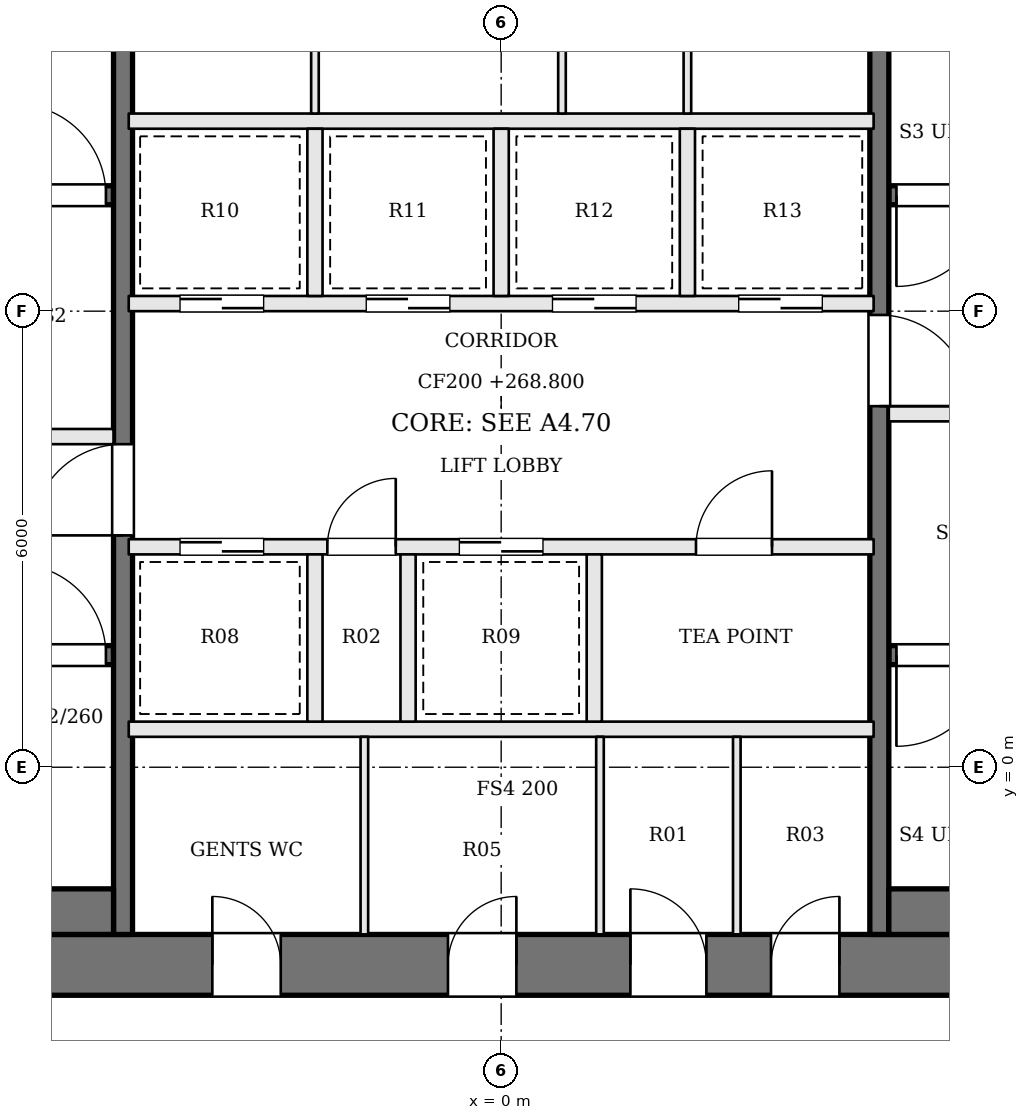
"""IFC4 building model, lengths in metres.
Left out: names, types, materials, properties, quantities, classifications, styles, units other than length and angle.
Written with IfcOpenShell. Run it as: python <this file> out.ifc"""

import sys

from ifc_helpers import new_model, si_unit, direction, frame, frame_2d, origin, place, context, subcontext, project, spatial, rectangle, extrude, element, fill, save


model = new_model("IFC4")
c1 = context("Model", 3, precision=1e-05, world=origin(), true_north=direction((0.0, 1.0)))
c2 = subcontext(c1, "Body", "Model", "MODEL_VIEW")
j1 = project(units=[si_unit("LENGTHUNIT", "METRE"), si_unit("PLANEANGLEUNIT", "RADIAN")], contexts=[c1])
p1 = place(None, origin())
s1 = spatial("IfcSite", under=j1, at=p1, CompositionType="ELEMENT")
p2 = place(p1, origin())
s2 = spatial("IfcBuilding", under=s1, at=p2, CompositionType="ELEMENT")
p3 = place(p2, frame((0.0, 0.0, 268.8)))
s3 = spatial("IfcBuildingStorey", under=s2, at=p3, CompositionType="ELEMENT", Elevation=268.8)
p4 = place(p3, frame((-13.0, -2.6, 0.0), z_axis=(0.0, 0.0, 1.0), x_axis=(1.0, 0.0, 0.0)))
e1 = element("IfcWall", 1, at=p4, inside=s3, PredefinedType="SHEAR", context=c2, shape_type="SweptSolid", body=[
    extrude(rectangle(XDim=26.0, YDim=0.8, at=frame_2d((13.0, 0.0))), origin(), (0.0, 0.0, 1.0), 3.9),
])
p5 = place(p4, frame((9.2, 0.0, 0.0)))
e2 = element("IfcOpeningElement", 2, at=p5, cuts=e1, PredefinedType="OPENING", context=c2, shape_type="SweptSolid", body=[
    extrude(rectangle(XDim=0.9, YDim=2.1, at=frame_2d((0.45, 1.05))), frame((0.0, 0.41, 0.0), z_axis=(0.0, -1.0, 0.0), x_axis=(1.0, 0.0, 0.0)), (0.0, 0.0, 1.0), 0.82),
])
p6 = place(p4, frame((12.3, 0.0, 0.0)))
e3 = element("IfcOpeningElement", 3, at=p6, cuts=e1, PredefinedType="OPENING", context=c2, shape_type="SweptSolid", body=[
    extrude(rectangle(XDim=0.9, YDim=2.1, at=frame_2d((0.45, 1.05))), frame((0.0, 0.41, 0.0), z_axis=(0.0, -1.0, 0.0), x_axis=(1.0, 0.0, 0.0)), (0.0, 0.0, 1.0), 0.82),
])
p7 = place(p4, frame((14.7, 0.0, 0.0)))
e4 = element("IfcOpeningElement", 4, at=p7, cuts=e1, PredefinedType="OPENING", context=c2, shape_type="SweptSolid", body=[
    extrude(rectangle(XDim=1.0, YDim=2.1, at=frame_2d((0.5, 1.05))), frame((0.0, 0.41, 0.0), z_axis=(0.0, -1.0, 0.0), x_axis=(1.0, 0.0, 0.0)), (0.0, 0.0, 1.0), 0.82),
])
p8 = place(p4, frame((16.55, 0.0, 0.0)))
e5 = element("IfcOpeningElement", 5, at=p8, cuts=e1, PredefinedType="OPENING", context=c2, shape_type="SweptSolid", body=[
    extrude(rectangle(XDim=0.9, YDim=2.1, at=frame_2d((0.45, 1.05))), frame((0.0, 0.41, 0.0), z_axis=(0.0, -1.0, 0.0), x_axis=(1.0, 0.0, 0.0)), (0.0, 0.0, 1.0), 0.82),
])
p9 = place(p3, frame((-12.2, 1.475, 0.0), z_axis=(0.0, 0.0, 1.0), x_axis=(1.0, 0.0, 0.0)))
e6 = element("IfcWall", 6, at=p9, inside=s3, PredefinedType="SOLIDWALL", context=c2, shape_type="SweptSolid", body=[
    extrude(rectangle(XDim=7.1, YDim=0.25, at=frame_2d((3.55, 0.0))), origin(), (0.0, 0.0, 1.0), 3.7),
])
p10 = place(p9, frame((5.8, 0.0, 0.0)))
e7 = element("IfcOpeningElement", 7, at=p10, cuts=e6, PredefinedType="OPENING", context=c2, shape_type="SweptSolid", body=[
    extrude(rectangle(XDim=1.2, YDim=2.1, at=frame_2d((0.6, 1.05))), frame((0.0, 0.135, 0.0), z_axis=(0.0, -1.0, 0.0), x_axis=(1.0, 0.0, 0.0)), (0.0, 0.0, 1.0), 0.27),
])
p11 = place(p3, frame((12.2, 7.525, 0.0), z_axis=(0.0, 0.0, 1.0), x_axis=(-1.0, 0.0, 0.0)))
e8 = element("IfcWall", 8, at=p11, inside=s3, PredefinedType="SOLIDWALL", context=c2, shape_type="SweptSolid", body=[
    extrude(rectangle(XDim=7.1, YDim=0.25, at=frame_2d((3.55, 0.0))), origin(), (0.0, 0.0, 1.0), 3.7),
])
p12 = place(p11, frame((5.8, 0.0, 0.0)))
e9 = element("IfcOpeningElement", 9, at=p12, cuts=e8, PredefinedType="OPENING", context=c2, shape_type="SweptSolid", body=[
    extrude(rectangle(XDim=1.2, YDim=2.1, at=frame_2d((0.6, 1.05))), frame((0.0, 0.135, 0.0), z_axis=(0.0, -1.0, 0.0), x_axis=(1.0, 0.0, 0.0)), (0.0, 0.0, 1.0), 0.27),
])
p13 = place(p3, frame((-12.2, 4.35, 0.0), z_axis=(0.0, 0.0, 1.0), x_axis=(1.0, 0.0, 0.0)))
e10 = element("IfcWall", 10, at=p13, inside=s3, PredefinedType="SOLIDWALL", context=c2, shape_type="SweptSolid", body=[
    extrude(rectangle(XDim=7.1, YDim=0.2, at=frame_2d((3.55, 0.0))), origin(), (0.0, 0.0, 1.0), 3.7),
])
p14 = place(p13, frame((4.4, 0.0, 0.0)))
e11 = element("IfcOpeningElement", 11, at=p14, cuts=e10, PredefinedType="OPENING", context=c2, shape_type="SweptSolid", body=[
    extrude(rectangle(XDim=1.2, YDim=2.1, at=frame_2d((0.6, 1.05))), frame((0.0, 0.11, 0.0), z_axis=(0.0, -1.0, 0.0), x_axis=(1.0, 0.0, 0.0)), (0.0, 0.0, 1.0), 0.22),
])
p15 = place(p13, frame((1.1, 0.0, 0.0)))
e12 = element("IfcOpeningElement", 12, at=p15, cuts=e10, PredefinedType="OPENING", context=c2, shape_type="SweptSolid", body=[
    extrude(rectangle(XDim=1.2, YDim=2.1, at=frame_2d((0.6, 1.05))), frame((0.0, 0.11, 0.0), z_axis=(0.0, -1.0, 0.0), x_axis=(1.0, 0.0, 0.0)), (0.0, 0.0, 1.0), 0.22),
])
p16 = place(p3, frame((12.2, 4.65, 0.0), z_axis=(0.0, 0.0, 1.0), x_axis=(-1.0, 0.0, 0.0)))
e13 = element("IfcWall", 13, at=p16, inside=s3, PredefinedType="SOLIDWALL", context=c2, shape_type="SweptSolid", body=[
    extrude(rectangle(XDim=7.1, YDim=0.2, at=frame_2d((3.55, 0.0))), origin(), (0.0, 0.0, 1.0), 3.7),
])
p17 = place(p16, frame((4.4, 0.0, 0.0)))
e14 = element("IfcOpeningElement", 14, at=p17, cuts=e13, PredefinedType="OPENING", context=c2, shape_type="SweptSolid", body=[
    extrude(rectangle(XDim=1.2, YDim=2.1, at=frame_2d((0.6, 1.05))), frame((0.0, 0.11, 0.0), z_axis=(0.0, -1.0, 0.0), x_axis=(1.0, 0.0, 0.0)), (0.0, 0.0, 1.0), 0.22),
])
p18 = place(p16, frame((1.1, 0.0, 0.0)))
e15 = element("IfcOpeningElement", 15, at=p18, cuts=e13, PredefinedType="OPENING", context=c2, shape_type="SweptSolid", body=[
    extrude(rectangle(XDim=1.2, YDim=2.1, at=frame_2d((0.6, 1.05))), frame((0.0, 0.11, 0.0), z_axis=(0.0, -1.0, 0.0), x_axis=(1.0, 0.0, 0.0)), (0.0, 0.0, 1.0), 0.22),
])
p19 = place(p3, frame((-12.2, 7.525, 0.0), z_axis=(0.0, 0.0, 1.0), x_axis=(1.0, 0.0, 0.0)))
e16 = element("IfcWall", 16, at=p19, inside=s3, PredefinedType="SOLIDWALL", context=c2, shape_type="SweptSolid", body=[
    extrude(rectangle(XDim=7.1, YDim=0.25, at=frame_2d((3.55, 0.0))), origin(), (0.0, 0.0, 1.0), 3.7),
])
p20 = place(p19, frame((5.8, 0.0, 0.0)))
e17 = element("IfcOpeningElement", 17, at=p20, cuts=e16, PredefinedType="OPENING", context=c2, shape_type="SweptSolid", body=[
    extrude(rectangle(XDim=1.2, YDim=2.1, at=frame_2d((0.6, 1.05))), frame((0.0, 0.135, 0.0), z_axis=(0.0, -1.0, 0.0), x_axis=(1.0, 0.0, 0.0)), (0.0, 0.0, 1.0), 0.27),
])
p21 = place(p3, frame((12.2, 1.475, 0.0), z_axis=(0.0, 0.0, 1.0), x_axis=(-1.0, 0.0, 0.0)))
e18 = element("IfcWall", 18, at=p21, inside=s3, PredefinedType="SOLIDWALL", context=c2, shape_type="SweptSolid", body=[
    extrude(rectangle(XDim=7.1, YDim=0.25, at=frame_2d((3.55, 0.0))), origin(), (0.0, 0.0, 1.0), 3.7),
])
p22 = place(p21, frame((5.8, 0.0, 0.0)))
e19 = element("IfcOpeningElement", 19, at=p22, cuts=e18, PredefinedType="OPENING", context=c2, shape_type="SweptSolid", body=[
    extrude(rectangle(XDim=1.2, YDim=2.1, at=frame_2d((0.6, 1.05))), frame((0.0, 0.135, 0.0), z_axis=(0.0, -1.0, 0.0), x_axis=(1.0, 0.0, 0.0)), (0.0, 0.0, 1.0), 0.27),
])
p23 = place(p3, frame((-4.975, -2.2, 0.0), z_axis=(0.0, 0.0, 1.0), x_axis=(0.0, 1.0, 0.0)))
e20 = element("IfcWall", 20, at=p23, inside=s3, PredefinedType="SOLIDWALL", context=c2, shape_type="SweptSolid", body=[
    extrude(rectangle(XDim=13.4, YDim=0.25, at=frame_2d((6.7, 0.0))), origin(), (0.0, 0.0, 1.0), 3.7),
])
p24 = place(p23, frame((5.25, 0.0, 0.0)))
e21 = element("IfcOpeningElement", 21, at=p24, cuts=e20, PredefinedType="OPENING", context=c2, shape_type="SweptSolid", body=[
    extrude(rectangle(XDim=1.2, YDim=2.1, at=frame_2d((0.6, 1.05))), frame((0.0, 0.135, 0.0), z_axis=(0.0, -1.0, 0.0), x_axis=(1.0, 0.0, 0.0)), (0.0, 0.0, 1.0), 0.27),
])
p25 = place(p3, frame((4.975, 11.2, 0.0), z_axis=(0.0, 0.0, 1.0), x_axis=(0.0, -1.0, 0.0)))
e22 = element("IfcWall", 22, at=p25, inside=s3, PredefinedType="SOLIDWALL", context=c2, shape_type="SweptSolid", body=[
    extrude(rectangle(XDim=13.4, YDim=0.25, at=frame_2d((6.7, 0.0))), origin(), (0.0, 0.0, 1.0), 3.7),
])
p26 = place(p25, frame((5.25, 0.0, 0.0)))
e23 = element("IfcOpeningElement", 23, at=p26, cuts=e22, PredefinedType="OPENING", context=c2, shape_type="SweptSolid", body=[
    extrude(rectangle(XDim=1.2, YDim=2.1, at=frame_2d((0.6, 1.05))), frame((0.0, 0.135, 0.0), z_axis=(0.0, -1.0, 0.0), x_axis=(1.0, 0.0, 0.0)), (0.0, 0.0, 1.0), 0.27),
])
for number, where, z_axis, x_axis in (
    (24, (-12.2, -1.9, 0.0), (0.0, 0.0, 1.0), (1.0, 0.0, 0.0)),
    (25, (12.2, -1.9, 0.0), (0.0, 0.0, 1.0), (-1.0, 0.0, 0.0)),
):
    element("IfcWall", number, at=place(p3, frame(where, z_axis=z_axis, x_axis=x_axis)), inside=s3, PredefinedType="SOLIDWALL", context=c2, shape_type="SweptSolid", body=[
        extrude(rectangle(XDim=7.1, YDim=0.6, at=frame_2d((3.55, 0.0))), origin(), (0.0, 0.0, 1.0), 3.7),
    ])
p27 = place(p3, frame((-4.9, 0.5, 0.0), z_axis=(0.0, 0.0, 1.0), x_axis=(1.0, 0.0, 0.0)))
e26 = element("IfcWall", 26, at=p27, inside=s3, PredefinedType="SOLIDWALL", context=c2, shape_type="SweptSolid", body=[
    extrude(rectangle(XDim=9.8, YDim=0.2, at=frame_2d((4.9, 0.0))), origin(), (0.0, 0.0, 1.0), 3.7),
])
p28 = place(p3, frame((-4.9, 2.9, 0.0), z_axis=(0.0, 0.0, 1.0), x_axis=(1.0, 0.0, 0.0)))
e27 = element("IfcWall", 27, at=p28, inside=s3, PredefinedType="SOLIDWALL", context=c2, shape_type="SweptSolid", body=[
    extrude(rectangle(XDim=9.8, YDim=0.2, at=frame_2d((4.9, 0.0))), origin(), (0.0, 0.0, 1.0), 3.7),
])
p29 = place(p28, frame((0.675, 0.0, 0.0)))
e28 = element("IfcOpeningElement", 28, at=p29, cuts=e27, PredefinedType="OPENING", context=c2, shape_type="SweptSolid", body=[
    extrude(rectangle(XDim=1.1, YDim=2.1, at=frame_2d((0.55, 1.05))), frame((0.0, 0.11, 0.0), z_axis=(0.0, -1.0, 0.0), x_axis=(1.0, 0.0, 0.0)), (0.0, 0.0, 1.0), 0.22),
])
p30 = place(p28, frame((2.613, 0.0, 0.0)))
e29 = element("IfcOpeningElement", 29, at=p30, cuts=e27, PredefinedType="OPENING", context=c2, shape_type="SweptSolid", body=[
    extrude(rectangle(XDim=0.9, YDim=2.1, at=frame_2d((0.45, 1.05))), frame((0.0, 0.11, 0.0), z_axis=(0.0, -1.0, 0.0), x_axis=(1.0, 0.0, 0.0)), (0.0, 0.0, 1.0), 0.22),
])
p31 = place(p28, frame((4.35, 0.0, 0.0)))
e30 = element("IfcOpeningElement", 30, at=p31, cuts=e27, PredefinedType="OPENING", context=c2, shape_type="SweptSolid", body=[
    extrude(rectangle(XDim=1.1, YDim=2.1, at=frame_2d((0.55, 1.05))), frame((0.0, 0.11, 0.0), z_axis=(0.0, -1.0, 0.0), x_axis=(1.0, 0.0, 0.0)), (0.0, 0.0, 1.0), 0.22),
])
p32 = place(p28, frame((7.463, 0.0, 0.0)))
e31 = element("IfcOpeningElement", 31, at=p32, cuts=e27, PredefinedType="OPENING", context=c2, shape_type="SweptSolid", body=[
    extrude(rectangle(XDim=1.0, YDim=2.1, at=frame_2d((0.5, 1.05))), frame((0.0, 0.11, 0.0), z_axis=(0.0, -1.0, 0.0), x_axis=(1.0, 0.0, 0.0)), (0.0, 0.0, 1.0), 0.22),
])
p33 = place(p3, frame((-4.9, 6.1, 0.0), z_axis=(0.0, 0.0, 1.0), x_axis=(1.0, 0.0, 0.0)))
e32 = element("IfcWall", 32, at=p33, inside=s3, PredefinedType="SOLIDWALL", context=c2, shape_type="SweptSolid", body=[
    extrude(rectangle(XDim=9.8, YDim=0.2, at=frame_2d((4.9, 0.0))), origin(), (0.0, 0.0, 1.0), 3.7),
])
p34 = place(p33, frame((0.675, 0.0, 0.0)))
e33 = element("IfcOpeningElement", 33, at=p34, cuts=e32, PredefinedType="OPENING", context=c2, shape_type="SweptSolid", body=[
    extrude(rectangle(XDim=1.1, YDim=2.1, at=frame_2d((0.55, 1.05))), frame((0.0, 0.11, 0.0), z_axis=(0.0, -1.0, 0.0), x_axis=(1.0, 0.0, 0.0)), (0.0, 0.0, 1.0), 0.22),
])
p35 = place(p33, frame((3.125, 0.0, 0.0)))
e34 = element("IfcOpeningElement", 34, at=p35, cuts=e32, PredefinedType="OPENING", context=c2, shape_type="SweptSolid", body=[
    extrude(rectangle(XDim=1.1, YDim=2.1, at=frame_2d((0.55, 1.05))), frame((0.0, 0.11, 0.0), z_axis=(0.0, -1.0, 0.0), x_axis=(1.0, 0.0, 0.0)), (0.0, 0.0, 1.0), 0.22),
])
p36 = place(p33, frame((5.575, 0.0, 0.0)))
e35 = element("IfcOpeningElement", 35, at=p36, cuts=e32, PredefinedType="OPENING", context=c2, shape_type="SweptSolid", body=[
    extrude(rectangle(XDim=1.1, YDim=2.1, at=frame_2d((0.55, 1.05))), frame((0.0, 0.11, 0.0), z_axis=(0.0, -1.0, 0.0), x_axis=(1.0, 0.0, 0.0)), (0.0, 0.0, 1.0), 0.22),
])
p37 = place(p33, frame((8.025, 0.0, 0.0)))
e36 = element("IfcOpeningElement", 36, at=p37, cuts=e32, PredefinedType="OPENING", context=c2, shape_type="SweptSolid", body=[
    extrude(rectangle(XDim=1.1, YDim=2.1, at=frame_2d((0.55, 1.05))), frame((0.0, 0.11, 0.0), z_axis=(0.0, -1.0, 0.0), x_axis=(1.0, 0.0, 0.0)), (0.0, 0.0, 1.0), 0.22),
])
p38 = place(p3, frame((-4.9, 8.5, 0.0), z_axis=(0.0, 0.0, 1.0), x_axis=(1.0, 0.0, 0.0)))
e37 = element("IfcWall", 37, at=p38, inside=s3, PredefinedType="SOLIDWALL", context=c2, shape_type="SweptSolid", body=[
    extrude(rectangle(XDim=9.8, YDim=0.2, at=frame_2d((4.9, 0.0))), origin(), (0.0, 0.0, 1.0), 3.7),
])
for number, where, z_axis, x_axis in (
    (38, (-2.45, 0.6, 0.0), (0.0, 0.0, 1.0), (0.0, 1.0, 0.0)),
    (39, (-1.225, 0.6, 0.0), (0.0, 0.0, 1.0), (0.0, 1.0, 0.0)),
    (40, (1.225, 0.6, 0.0), (0.0, 0.0, 1.0), (0.0, 1.0, 0.0)),
    (41, (-2.45, 6.2, 0.0), (0.0, 0.0, 1.0), (0.0, 1.0, 0.0)),
    (42, (0.0, 6.2, 0.0), (0.0, 0.0, 1.0), (0.0, 1.0, 0.0)),
    (43, (2.45, 6.2, 0.0), (0.0, 0.0, 1.0), (0.0, 1.0, 0.0)),
):
    element("IfcWall", number, at=place(p3, frame(where, z_axis=z_axis, x_axis=x_axis)), inside=s3, PredefinedType="SOLIDWALL", context=c2, shape_type="SweptSolid", body=[
        extrude(rectangle(XDim=2.2, YDim=0.2, at=frame_2d((1.1, 0.0))), origin(), (0.0, 0.0, 1.0), 3.7),
    ])
for number, where, z_axis, x_axis in (
    (44, (-1.8, -2.2, 0.0), (0.0, 0.0, 1.0), (0.0, 1.0, 0.0)),
    (45, (1.3, -2.2, 0.0), (0.0, 0.0, 1.0), (0.0, 1.0, 0.0)),
    (46, (3.1, -2.2, 0.0), (0.0, 0.0, 1.0), (0.0, 1.0, 0.0)),
    (47, (-2.45, 8.6, 0.0), (0.0, 0.0, 1.0), (0.0, 1.0, 0.0)),
    (48, (0.8, 8.6, 0.0), (0.0, 0.0, 1.0), (0.0, 1.0, 0.0)),
    (49, (2.45, 8.6, 0.0), (0.0, 0.0, 1.0), (0.0, 1.0, 0.0)),
):
    element("IfcWall", number, at=place(p3, frame(where, z_axis=z_axis, x_axis=x_axis)), inside=s3, PredefinedType="PARTITIONING", context=c2, shape_type="SweptSolid", body=[
        extrude(rectangle(XDim=2.6, YDim=0.1, at=frame_2d((1.3, 0.0))), origin(), (0.0, 0.0, 1.0), 3.7),
    ])
p39 = place(p24, origin())
e50 = element("IfcDoor", 50, at=p39, inside=s3, OperationType="SINGLE_SWING_LEFT", PredefinedType="DOOR", context=c2, shape_type="SweptSolid", body=[
    extrude(rectangle(XDim=1.2, YDim=2.1, at=frame_2d((0.6, 1.05))), frame((0.0, 0.025, 0.0), z_axis=(0.0, -1.0, 0.0), x_axis=(1.0, 0.0, 0.0)), (0.0, 0.0, 1.0), 0.05),
])
fill(e21, e50)
p40 = place(p26, origin())
e51 = element("IfcDoor", 51, at=p40, inside=s3, OperationType="SINGLE_SWING_RIGHT", PredefinedType="DOOR", context=c2, shape_type="SweptSolid", body=[
    extrude(rectangle(XDim=1.2, YDim=2.1, at=frame_2d((0.6, 1.05))), frame((0.0, 0.025, 0.0), z_axis=(0.0, -1.0, 0.0), x_axis=(1.0, 0.0, 0.0)), (0.0, 0.0, 1.0), 0.05),
])
fill(e23, e51)
p41 = place(p10, origin())
e52 = element("IfcDoor", 52, at=p41, inside=s3, OperationType="SINGLE_SWING_LEFT", PredefinedType="DOOR", context=c2, shape_type="SweptSolid", body=[
    extrude(rectangle(XDim=1.2, YDim=2.1, at=frame_2d((0.6, 1.05))), frame((0.0, 0.025, 0.0), z_axis=(0.0, -1.0, 0.0), x_axis=(1.0, 0.0, 0.0)), (0.0, 0.0, 1.0), 0.05),
])
fill(e7, e52)
p42 = place(p12, origin())
e53 = element("IfcDoor", 53, at=p42, inside=s3, OperationType="SINGLE_SWING_RIGHT", PredefinedType="DOOR", context=c2, shape_type="SweptSolid", body=[
    extrude(rectangle(XDim=1.2, YDim=2.1, at=frame_2d((0.6, 1.05))), frame((0.0, 0.025, 0.0), z_axis=(0.0, -1.0, 0.0), x_axis=(1.0, 0.0, 0.0)), (0.0, 0.0, 1.0), 0.05),
])
fill(e9, e53)
p43 = place(p20, origin())
e54 = element("IfcDoor", 54, at=p43, inside=s3, OperationType="SINGLE_SWING_LEFT", PredefinedType="DOOR", context=c2, shape_type="SweptSolid", body=[
    extrude(rectangle(XDim=1.2, YDim=2.1, at=frame_2d((0.6, 1.05))), frame((0.0, 0.025, 0.0), z_axis=(0.0, -1.0, 0.0), x_axis=(1.0, 0.0, 0.0)), (0.0, 0.0, 1.0), 0.05),
])
fill(e17, e54)
p44 = place(p22, origin())
e55 = element("IfcDoor", 55, at=p44, inside=s3, OperationType="SINGLE_SWING_RIGHT", PredefinedType="DOOR", context=c2, shape_type="SweptSolid", body=[
    extrude(rectangle(XDim=1.2, YDim=2.1, at=frame_2d((0.6, 1.05))), frame((0.0, 0.025, 0.0), z_axis=(0.0, -1.0, 0.0), x_axis=(1.0, 0.0, 0.0)), (0.0, 0.0, 1.0), 0.05),
])
fill(e19, e55)
p45 = place(p29, origin())
e56 = element("IfcDoor", 56, at=p45, inside=s3, OperationType="SLIDING_TO_RIGHT", PredefinedType="DOOR", context=c2, shape_type="SweptSolid", body=[
    extrude(rectangle(XDim=1.1, YDim=2.1, at=frame_2d((0.55, 1.05))), frame((0.0, 0.025, 0.0), z_axis=(0.0, -1.0, 0.0), x_axis=(1.0, 0.0, 0.0)), (0.0, 0.0, 1.0), 0.05),
])
fill(e28, e56)
p46 = place(p30, origin())
e57 = element("IfcDoor", 57, at=p46, inside=s3, OperationType="SINGLE_SWING_RIGHT", PredefinedType="DOOR", context=c2, shape_type="SweptSolid", body=[
    extrude(rectangle(XDim=0.9, YDim=2.1, at=frame_2d((0.45, 1.05))), frame((0.0, 0.025, 0.0), z_axis=(0.0, -1.0, 0.0), x_axis=(1.0, 0.0, 0.0)), (0.0, 0.0, 1.0), 0.05),
])
fill(e29, e57)
p47 = place(p31, origin())
e58 = element("IfcDoor", 58, at=p47, inside=s3, OperationType="SLIDING_TO_LEFT", PredefinedType="DOOR", context=c2, shape_type="SweptSolid", body=[
    extrude(rectangle(XDim=1.1, YDim=2.1, at=frame_2d((0.55, 1.05))), frame((0.0, 0.025, 0.0), z_axis=(0.0, -1.0, 0.0), x_axis=(1.0, 0.0, 0.0)), (0.0, 0.0, 1.0), 0.05),
])
fill(e30, e58)
p48 = place(p32, origin())
e59 = element("IfcDoor", 59, at=p48, inside=s3, OperationType="SINGLE_SWING_RIGHT", PredefinedType="DOOR", context=c2, shape_type="SweptSolid", body=[
    extrude(rectangle(XDim=1.0, YDim=2.1, at=frame_2d((0.5, 1.05))), frame((0.0, 0.025, 0.0), z_axis=(0.0, -1.0, 0.0), x_axis=(1.0, 0.0, 0.0)), (0.0, 0.0, 1.0), 0.05),
])
fill(e31, e59)
p49 = place(p34, origin())
e60 = element("IfcDoor", 60, at=p49, inside=s3, OperationType="SLIDING_TO_RIGHT", PredefinedType="DOOR", context=c2, shape_type="SweptSolid", body=[
    extrude(rectangle(XDim=1.1, YDim=2.1, at=frame_2d((0.55, 1.05))), frame((0.0, 0.025, 0.0), z_axis=(0.0, -1.0, 0.0), x_axis=(1.0, 0.0, 0.0)), (0.0, 0.0, 1.0), 0.05),
])
fill(e33, e60)
p50 = place(p35, origin())
e61 = element("IfcDoor", 61, at=p50, inside=s3, OperationType="SLIDING_TO_LEFT", PredefinedType="DOOR", context=c2, shape_type="SweptSolid", body=[
    extrude(rectangle(XDim=1.1, YDim=2.1, at=frame_2d((0.55, 1.05))), frame((0.0, 0.025, 0.0), z_axis=(0.0, -1.0, 0.0), x_axis=(1.0, 0.0, 0.0)), (0.0, 0.0, 1.0), 0.05),
])
fill(e34, e61)
p51 = place(p36, origin())
e62 = element("IfcDoor", 62, at=p51, inside=s3, OperationType="SLIDING_TO_RIGHT", PredefinedType="DOOR", context=c2, shape_type="SweptSolid", body=[
    extrude(rectangle(XDim=1.1, YDim=2.1, at=frame_2d((0.55, 1.05))), frame((0.0, 0.025, 0.0), z_axis=(0.0, -1.0, 0.0), x_axis=(1.0, 0.0, 0.0)), (0.0, 0.0, 1.0), 0.05),
])
fill(e35, e62)
p52 = place(p37, origin())
e63 = element("IfcDoor", 63, at=p52, inside=s3, OperationType="SLIDING_TO_LEFT", PredefinedType="DOOR", context=c2, shape_type="SweptSolid", body=[
    extrude(rectangle(XDim=1.1, YDim=2.1, at=frame_2d((0.55, 1.05))), frame((0.0, 0.025, 0.0), z_axis=(0.0, -1.0, 0.0), x_axis=(1.0, 0.0, 0.0)), (0.0, 0.0, 1.0), 0.05),
])
fill(e36, e63)
p53 = place(p5, origin())
e64 = element("IfcDoor", 64, at=p53, inside=s3, OperationType="SINGLE_SWING_LEFT", PredefinedType="DOOR", context=c2, shape_type="SweptSolid", body=[
    extrude(rectangle(XDim=0.9, YDim=2.1, at=frame_2d((0.45, 1.05))), frame((0.0, 0.025, 0.0), z_axis=(0.0, -1.0, 0.0), x_axis=(1.0, 0.0, 0.0)), (0.0, 0.0, 1.0), 0.05),
])
fill(e2, e64)
p54 = place(p6, origin())
e65 = element("IfcDoor", 65, at=p54, inside=s3, OperationType="SINGLE_SWING_RIGHT", PredefinedType="DOOR", context=c2, shape_type="SweptSolid", body=[
    extrude(rectangle(XDim=0.9, YDim=2.1, at=frame_2d((0.45, 1.05))), frame((0.0, 0.025, 0.0), z_axis=(0.0, -1.0, 0.0), x_axis=(1.0, 0.0, 0.0)), (0.0, 0.0, 1.0), 0.05),
])
fill(e3, e65)
p55 = place(p7, origin())
e66 = element("IfcDoor", 66, at=p55, inside=s3, OperationType="SINGLE_SWING_LEFT", PredefinedType="DOOR", context=c2, shape_type="SweptSolid", body=[
    extrude(rectangle(XDim=1.0, YDim=2.1, at=frame_2d((0.5, 1.05))), frame((0.0, 0.025, 0.0), z_axis=(0.0, -1.0, 0.0), x_axis=(1.0, 0.0, 0.0)), (0.0, 0.0, 1.0), 0.05),
])
fill(e4, e66)
p56 = place(p8, origin())
e67 = element("IfcDoor", 67, at=p56, inside=s3, OperationType="SINGLE_SWING_RIGHT", PredefinedType="DOOR", context=c2, shape_type="SweptSolid", body=[
    extrude(rectangle(XDim=0.9, YDim=2.1, at=frame_2d((0.45, 1.05))), frame((0.0, 0.025, 0.0), z_axis=(0.0, -1.0, 0.0), x_axis=(1.0, 0.0, 0.0)), (0.0, 0.0, 1.0), 0.05),
])
fill(e5, e67)
save(model, sys.argv[1])
